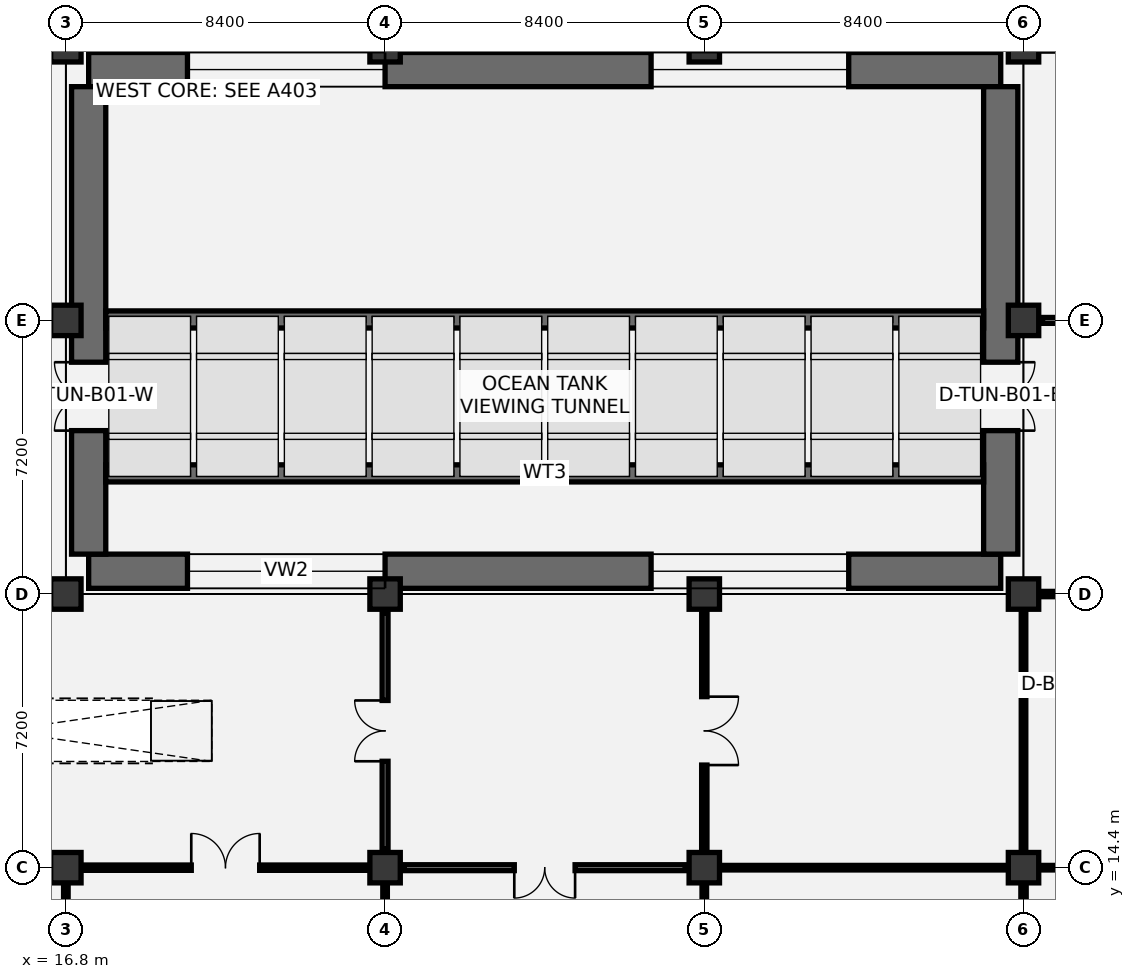
"""IFC4 building model, lengths in metres.
Left out: names, types, materials, properties, quantities, classifications, styles, units other than length and angle.
Written with IfcOpenShell. Run it as: python <this file> out.ifc"""

import sys

from ifc_helpers import new_model, si_unit, direction, frame, frame_2d, origin, origin_2d, place, context, subcontext, project, spatial, rectangle, extrude, element, fill, save


model = new_model("IFC4")
c1 = context("Model", 3, precision=1e-05, world=origin(), true_north=direction((0.0, 1.0)))
c2 = subcontext(c1, "Body", "Model", "MODEL_VIEW")
j1 = project(units=[si_unit("LENGTHUNIT", "METRE"), si_unit("PLANEANGLEUNIT", "RADIAN")], contexts=[c1])
p1 = place(None, origin())
s1 = spatial("IfcSite", under=j1, at=p1, CompositionType="ELEMENT")
p2 = place(p1, origin())
s2 = spatial("IfcBuilding", under=s1, at=p2, CompositionType="ELEMENT")
p3 = place(p2, frame((0.0, 0.0, -4.8)))
s3 = spatial("IfcBuildingStorey", under=s2, at=p3, CompositionType="ELEMENT", Elevation=-4.8)
for number, where, z_axis, x_axis in (
    (1, (16.8, 14.4, 0.0), (0.0, 0.0, 1.0), (1.0, 0.0, 0.0)),
    (2, (16.8, 21.6, 0.0), (0.0, 0.0, 1.0), (1.0, 0.0, 0.0)),
    (3, (16.8, 28.8, 0.0), (0.0, 0.0, 1.0), (1.0, 0.0, 0.0)),
    (4, (16.8, 36.0, 0.0), (0.0, 0.0, 1.0), (1.0, 0.0, 0.0)),
    (5, (25.2, 14.4, 0.0), (0.0, 0.0, 1.0), (1.0, 0.0, 0.0)),
    (6, (25.2, 21.6, 0.0), (0.0, 0.0, 1.0), (1.0, 0.0, 0.0)),
    (7, (25.2, 36.0, 0.0), (0.0, 0.0, 1.0), (1.0, 0.0, 0.0)),
    (8, (33.6, 14.4, 0.0), (0.0, 0.0, 1.0), (1.0, 0.0, 0.0)),
    (9, (33.6, 21.6, 0.0), (0.0, 0.0, 1.0), (1.0, 0.0, 0.0)),
    (10, (33.6, 36.0, 0.0), (0.0, 0.0, 1.0), (1.0, 0.0, 0.0)),
    (11, (42.0, 14.4, 0.0), (0.0, 0.0, 1.0), (1.0, 0.0, 0.0)),
    (12, (42.0, 21.6, 0.0), (0.0, 0.0, 1.0), (1.0, 0.0, 0.0)),
    (13, (42.0, 28.8, 0.0), (0.0, 0.0, 1.0), (1.0, 0.0, 0.0)),
    (14, (42.0, 36.0, 0.0), (0.0, 0.0, 1.0), (1.0, 0.0, 0.0)),
):
    element("IfcColumn", number, at=place(p3, frame(where, z_axis=z_axis, x_axis=x_axis)), inside=s3, PredefinedType="COLUMN", context=c2, shape_type="SweptSolid", body=[
        extrude(rectangle(XDim=0.8, YDim=0.8, at=origin_2d()), origin(), (0.0, 0.0, 1.0), 4.8),
    ])
p4 = place(p3, frame((17.4, 22.2, 0.0), z_axis=(0.0, 0.0, 1.0), x_axis=(1.0, 0.0, 0.0)))
e15 = element("IfcWall", 15, at=p4, inside=s3, PredefinedType="SOLIDWALL", context=c2, shape_type="SweptSolid", body=[
    extrude(rectangle(XDim=24.0, YDim=0.9, at=frame_2d((12.0, 0.0))), origin(), (0.0, 0.0, 1.0), 4.8),
])
p5 = place(p4, frame((2.6, 0.0, 0.85)))
e16 = element("IfcOpeningElement", 16, at=p5, cuts=e15, PredefinedType="OPENING", context=c2, shape_type="SweptSolid", body=[
    extrude(rectangle(XDim=5.2, YDim=2.9, at=frame_2d((2.6, 1.45))), frame((0.0, 0.46, 0.0), z_axis=(0.0, -1.0, 0.0), x_axis=(1.0, 0.0, 0.0)), (0.0, 0.0, 1.0), 0.92),
])
p6 = place(p4, frame((14.8, 0.0, 0.85)))
e17 = element("IfcOpeningElement", 17, at=p6, cuts=e15, PredefinedType="OPENING", context=c2, shape_type="SweptSolid", body=[
    extrude(rectangle(XDim=5.2, YDim=2.9, at=frame_2d((2.6, 1.45))), frame((0.0, 0.46, 0.0), z_axis=(0.0, -1.0, 0.0), x_axis=(1.0, 0.0, 0.0)), (0.0, 0.0, 1.0), 0.92),
])
p7 = place(p3, frame((17.4, 35.4, 0.0), z_axis=(0.0, 0.0, 1.0), x_axis=(1.0, 0.0, 0.0)))
e18 = element("IfcWall", 18, at=p7, inside=s3, PredefinedType="SOLIDWALL", context=c2, shape_type="SweptSolid", body=[
    extrude(rectangle(XDim=24.0, YDim=0.9, at=frame_2d((12.0, 0.0))), origin(), (0.0, 0.0, 1.0), 4.8),
])
p8 = place(p7, frame((2.6, 0.0, 0.85)))
e19 = element("IfcOpeningElement", 19, at=p8, cuts=e18, PredefinedType="OPENING", context=c2, shape_type="SweptSolid", body=[
    extrude(rectangle(XDim=5.2, YDim=2.9, at=frame_2d((2.6, 1.45))), frame((0.0, 0.46, 0.0), z_axis=(0.0, -1.0, 0.0), x_axis=(1.0, 0.0, 0.0)), (0.0, 0.0, 1.0), 0.92),
])
p9 = place(p7, frame((14.8, 0.0, 0.85)))
e20 = element("IfcOpeningElement", 20, at=p9, cuts=e18, PredefinedType="OPENING", context=c2, shape_type="SweptSolid", body=[
    extrude(rectangle(XDim=5.2, YDim=2.9, at=frame_2d((2.6, 1.45))), frame((0.0, 0.46, 0.0), z_axis=(0.0, -1.0, 0.0), x_axis=(1.0, 0.0, 0.0)), (0.0, 0.0, 1.0), 0.92),
])
p10 = place(p3, frame((17.4, 22.65, 0.0), z_axis=(0.0, 0.0, 1.0), x_axis=(0.0, 1.0, 0.0)))
e21 = element("IfcWall", 21, at=p10, inside=s3, PredefinedType="SOLIDWALL", context=c2, shape_type="SweptSolid", body=[
    extrude(rectangle(XDim=12.3, YDim=0.9, at=frame_2d((6.15, 0.0))), origin(), (0.0, 0.0, 1.0), 4.8),
])
p11 = place(p10, frame((3.25, 0.0, 0.0)))
e22 = element("IfcOpeningElement", 22, at=p11, cuts=e21, PredefinedType="OPENING", context=c2, shape_type="SweptSolid", body=[
    extrude(rectangle(XDim=1.8, YDim=2.2, at=frame_2d((0.9, 1.1))), frame((0.0, 0.46, 0.0), z_axis=(0.0, -1.0, 0.0), x_axis=(1.0, 0.0, 0.0)), (0.0, 0.0, 1.0), 0.92),
])
p12 = place(p3, frame((41.4, 22.65, 0.0), z_axis=(0.0, 0.0, 1.0), x_axis=(0.0, 1.0, 0.0)))
e23 = element("IfcWall", 23, at=p12, inside=s3, PredefinedType="SOLIDWALL", context=c2, shape_type="SweptSolid", body=[
    extrude(rectangle(XDim=12.3, YDim=0.9, at=frame_2d((6.15, 0.0))), origin(), (0.0, 0.0, 1.0), 4.8),
])
p13 = place(p12, frame((3.25, 0.0, 0.0)))
e24 = element("IfcOpeningElement", 24, at=p13, cuts=e23, PredefinedType="OPENING", context=c2, shape_type="SweptSolid", body=[
    extrude(rectangle(XDim=1.8, YDim=2.2, at=frame_2d((0.9, 1.1))), frame((0.0, 0.46, 0.0), z_axis=(0.0, -1.0, 0.0), x_axis=(1.0, 0.0, 0.0)), (0.0, 0.0, 1.0), 0.92),
])
for number, where, z_axis, x_axis in (
    (25, (17.85, 24.775, 0.0), (0.0, 0.0, 1.0), (1.0, 0.0, 0.0)),
    (26, (17.85, 28.825, 0.0), (0.0, 0.0, 1.0), (1.0, 0.0, 0.0)),
):
    element("IfcWall", number, at=place(p3, frame(where, z_axis=z_axis, x_axis=x_axis)), inside=s3, PredefinedType="SOLIDWALL", context=c2, shape_type="SweptSolid", body=[
        extrude(rectangle(XDim=23.1, YDim=0.45, at=frame_2d((11.55, 0.0))), origin(), (0.0, 0.0, 1.0), 0.9),
    ])
p14 = place(p3, frame((42.15, 19.2, 0.0), z_axis=(0.0, 0.0, 1.0), x_axis=(1.0, 0.0, 0.0)))
e27 = element("IfcWall", 27, at=p14, inside=s3, PredefinedType="PARTITIONING", context=c2, shape_type="SweptSolid", body=[
    extrude(rectangle(XDim=8.1, YDim=0.12, at=frame_2d((4.05, 0.0))), origin(), (0.0, 0.0, 1.0), 4.45),
])
p15 = place(p14, frame((1.08, 0.0, 0.0)))
e28 = element("IfcOpeningElement", 28, at=p15, cuts=e27, PredefinedType="OPENING", context=c2, shape_type="SweptSolid", body=[
    extrude(rectangle(XDim=0.95, YDim=2.1, at=frame_2d((0.475, 1.05))), frame((0.0, 0.07, 0.0), z_axis=(0.0, -1.0, 0.0), x_axis=(1.0, 0.0, 0.0)), (0.0, 0.0, 1.0), 0.14),
])
p16 = place(p14, frame((3.63, 0.0, 0.0)))
e29 = element("IfcOpeningElement", 29, at=p16, cuts=e27, PredefinedType="OPENING", context=c2, shape_type="SweptSolid", body=[
    extrude(rectangle(XDim=0.9, YDim=2.1, at=frame_2d((0.45, 1.05))), frame((0.0, 0.07, 0.0), z_axis=(0.0, -1.0, 0.0), x_axis=(1.0, 0.0, 0.0)), (0.0, 0.0, 1.0), 0.14),
])
p17 = place(p14, frame((6.13, 0.0, 0.0)))
e30 = element("IfcOpeningElement", 30, at=p17, cuts=e27, PredefinedType="OPENING", context=c2, shape_type="SweptSolid", body=[
    extrude(rectangle(XDim=1.0, YDim=2.1, at=frame_2d((0.5, 1.05))), frame((0.0, 0.07, 0.0), z_axis=(0.0, -1.0, 0.0), x_axis=(1.0, 0.0, 0.0)), (0.0, 0.0, 1.0), 0.14),
])
for number, where, z_axis, x_axis in (
    (31, (16.8, 7.7, 0.0), (0.0, 0.0, 1.0), (0.0, 1.0, 0.0)),
    (32, (25.2, 7.7, 0.0), (0.0, 0.0, 1.0), (0.0, 1.0, 0.0)),
):
    element("IfcWall", number, at=place(p3, frame(where, z_axis=z_axis, x_axis=x_axis)), inside=s3, PredefinedType="PARTITIONING", context=c2, shape_type="SweptSolid", body=[
        extrude(rectangle(XDim=6.2, YDim=0.12, at=frame_2d((3.1, 0.0))), origin(), (0.0, 0.0, 1.0), 3.645),
    ])
p18 = place(p3, frame((17.3, 14.4, 0.0), z_axis=(0.0, 0.0, 1.0), x_axis=(1.0, 0.0, 0.0)))
e33 = element("IfcWall", 33, at=p18, inside=s3, PredefinedType="PARTITIONING", context=c2, shape_type="SweptSolid", body=[
    extrude(rectangle(XDim=7.4, YDim=0.14, at=frame_2d((3.7, 0.0))), origin(), (0.0, 0.0, 1.0), 3.545),
])
p19 = place(p18, frame((2.8, 0.0, 0.0)))
e34 = element("IfcOpeningElement", 34, at=p19, cuts=e33, PredefinedType="OPENING", context=c2, shape_type="SweptSolid", body=[
    extrude(rectangle(XDim=1.8, YDim=2.25, at=frame_2d((0.9, 1.125))), frame((0.0, 0.08, 0.0), z_axis=(0.0, -1.0, 0.0), x_axis=(1.0, 0.0, 0.0)), (0.0, 0.0, 1.0), 0.16),
])
p20 = place(p3, frame((25.2, 14.9, 0.0), z_axis=(0.0, 0.0, 1.0), x_axis=(0.0, 1.0, 0.0)))
e35 = element("IfcWall", 35, at=p20, inside=s3, PredefinedType="PARTITIONING", context=c2, shape_type="SweptSolid", body=[
    extrude(rectangle(XDim=6.2, YDim=0.155, at=frame_2d((3.1, 0.0))), origin(), (0.0, 0.0, 1.0), 3.645),
])
p21 = place(p20, frame((2.3, 0.0, 0.0)))
e36 = element("IfcOpeningElement", 36, at=p21, cuts=e35, PredefinedType="OPENING", context=c2, shape_type="SweptSolid", body=[
    extrude(rectangle(XDim=1.6, YDim=2.2, at=frame_2d((0.8, 1.1))), frame((0.0, 0.087, 0.0), z_axis=(0.0, -1.0, 0.0), x_axis=(1.0, 0.0, 0.0)), (0.0, 0.0, 1.0), 0.175),
])
p22 = place(p3, frame((33.6, 7.7, 0.0), z_axis=(0.0, 0.0, 1.0), x_axis=(0.0, 1.0, 0.0)))
e37 = element("IfcWall", 37, at=p22, inside=s3, PredefinedType="PARTITIONING", context=c2, shape_type="SweptSolid", body=[
    extrude(rectangle(XDim=6.2, YDim=0.12, at=frame_2d((3.1, 0.0))), origin(), (0.0, 0.0, 1.0), 3.645),
])
p23 = place(p3, frame((25.7, 14.4, 0.0), z_axis=(0.0, 0.0, 1.0), x_axis=(1.0, 0.0, 0.0)))
e38 = element("IfcWall", 38, at=p23, inside=s3, PredefinedType="PARTITIONING", context=c2, shape_type="SweptSolid", body=[
    extrude(rectangle(XDim=7.4, YDim=0.155, at=frame_2d((3.7, 0.0))), origin(), (0.0, 0.0, 1.0), 3.545),
])
p24 = place(p23, frame((2.9, 0.0, 0.0)))
e39 = element("IfcOpeningElement", 39, at=p24, cuts=e38, PredefinedType="OPENING", context=c2, shape_type="SweptSolid", body=[
    extrude(rectangle(XDim=1.6, YDim=2.2, at=frame_2d((0.8, 1.1))), frame((0.0, 0.087, 0.0), z_axis=(0.0, -1.0, 0.0), x_axis=(1.0, 0.0, 0.0)), (0.0, 0.0, 1.0), 0.175),
])
p25 = place(p3, frame((33.6, 14.9, 0.0), z_axis=(0.0, 0.0, 1.0), x_axis=(0.0, 1.0, 0.0)))
e40 = element("IfcWall", 40, at=p25, inside=s3, PredefinedType="PARTITIONING", context=c2, shape_type="SweptSolid", body=[
    extrude(rectangle(XDim=6.2, YDim=0.14, at=frame_2d((3.1, 0.0))), origin(), (0.0, 0.0, 1.0), 3.645),
])
p26 = place(p25, frame((2.2, 0.0, 0.0)))
e41 = element("IfcOpeningElement", 41, at=p26, cuts=e40, PredefinedType="OPENING", context=c2, shape_type="SweptSolid", body=[
    extrude(rectangle(XDim=1.8, YDim=2.25, at=frame_2d((0.9, 1.125))), frame((0.0, 0.08, 0.0), z_axis=(0.0, -1.0, 0.0), x_axis=(1.0, 0.0, 0.0)), (0.0, 0.0, 1.0), 0.16),
])
p27 = place(p3, frame((42.0, 7.7, 0.0), z_axis=(0.0, 0.0, 1.0), x_axis=(0.0, 1.0, 0.0)))
e42 = element("IfcWall", 42, at=p27, inside=s3, PredefinedType="PARTITIONING", context=c2, shape_type="SweptSolid", body=[
    extrude(rectangle(XDim=6.2, YDim=0.14, at=frame_2d((3.1, 0.0))), origin(), (0.0, 0.0, 1.0), 3.645),
])
p28 = place(p27, frame((2.3, 0.0, 0.0)))
e43 = element("IfcOpeningElement", 43, at=p28, cuts=e42, PredefinedType="OPENING", context=c2, shape_type="SweptSolid", body=[
    extrude(rectangle(XDim=1.6, YDim=2.2, at=frame_2d((0.8, 1.1))), frame((0.0, 0.08, 0.0), z_axis=(0.0, -1.0, 0.0), x_axis=(1.0, 0.0, 0.0)), (0.0, 0.0, 1.0), 0.16),
])
p29 = place(p3, frame((34.1, 14.4, 0.0), z_axis=(0.0, 0.0, 1.0), x_axis=(1.0, 0.0, 0.0)))
e44 = element("IfcWall", 44, at=p29, inside=s3, PredefinedType="PARTITIONING", context=c2, shape_type="SweptSolid", body=[
    extrude(rectangle(XDim=7.4, YDim=0.12, at=frame_2d((3.7, 0.0))), origin(), (0.0, 0.0, 1.0), 3.545),
])
p30 = place(p3, frame((42.0, 14.9, 0.0), z_axis=(0.0, 0.0, 1.0), x_axis=(0.0, 1.0, 0.0)))
e45 = element("IfcWall", 45, at=p30, inside=s3, PredefinedType="PARTITIONING", context=c2, shape_type="SweptSolid", body=[
    extrude(rectangle(XDim=6.2, YDim=0.12, at=frame_2d((3.1, 0.0))), origin(), (0.0, 0.0, 1.0), 3.645),
])
p31 = place(p3, frame((42.5, 14.4, 0.0), z_axis=(0.0, 0.0, 1.0), x_axis=(1.0, 0.0, 0.0)))
e46 = element("IfcWall", 46, at=p31, inside=s3, PredefinedType="PARTITIONING", context=c2, shape_type="SweptSolid", body=[
    extrude(rectangle(XDim=7.4, YDim=0.12, at=frame_2d((3.7, 0.0))), origin(), (0.0, 0.0, 1.0), 3.545),
])
p32 = place(p3, frame((42.5, 21.6, 0.0), z_axis=(0.0, 0.0, 1.0), x_axis=(1.0, 0.0, 0.0)))
e47 = element("IfcWall", 47, at=p32, inside=s3, PredefinedType="PARTITIONING", context=c2, shape_type="SweptSolid", body=[
    extrude(rectangle(XDim=7.4, YDim=0.14, at=frame_2d((3.7, 0.0))), origin(), (0.0, 0.0, 1.0), 3.545),
])
p33 = place(p32, frame((2.8, 0.0, 0.0)))
e48 = element("IfcOpeningElement", 48, at=p33, cuts=e47, PredefinedType="OPENING", context=c2, shape_type="SweptSolid", body=[
    extrude(rectangle(XDim=1.8, YDim=2.25, at=frame_2d((0.9, 1.125))), frame((0.0, 0.08, 0.0), z_axis=(0.0, -1.0, 0.0), x_axis=(1.0, 0.0, 0.0)), (0.0, 0.0, 1.0), 0.16),
])
p34 = place(p3, frame((42.5, 28.8, 0.0), z_axis=(0.0, 0.0, 1.0), x_axis=(1.0, 0.0, 0.0)))
e49 = element("IfcWall", 49, at=p34, inside=s3, PredefinedType="PARTITIONING", context=c2, shape_type="SweptSolid", body=[
    extrude(rectangle(XDim=7.4, YDim=0.155, at=frame_2d((3.7, 0.0))), origin(), (0.0, 0.0, 1.0), 3.545),
])
p35 = place(p34, frame((2.9, 0.0, 0.0)))
e50 = element("IfcOpeningElement", 50, at=p35, cuts=e49, PredefinedType="OPENING", context=c2, shape_type="SweptSolid", body=[
    extrude(rectangle(XDim=1.6, YDim=2.2, at=frame_2d((0.8, 1.1))), frame((0.0, 0.087, 0.0), z_axis=(0.0, -1.0, 0.0), x_axis=(1.0, 0.0, 0.0)), (0.0, 0.0, 1.0), 0.175),
])
p36 = place(p5, origin())
e51 = element("IfcWindow", 51, at=p36, inside=s3, PartitioningType="SINGLE_PANEL", PredefinedType="WINDOW", context=c2, shape_type="SweptSolid", body=[
    extrude(rectangle(XDim=5.2, YDim=2.9, at=frame_2d((2.6, 1.45))), frame((0.0, 0.175, 0.0), z_axis=(0.0, -1.0, 0.0), x_axis=(1.0, 0.0, 0.0)), (0.0, 0.0, 1.0), 0.35),
])
fill(e16, e51)
p37 = place(p6, origin())
e52 = element("IfcWindow", 52, at=p37, inside=s3, PartitioningType="SINGLE_PANEL", PredefinedType="WINDOW", context=c2, shape_type="SweptSolid", body=[
    extrude(rectangle(XDim=5.2, YDim=2.9, at=frame_2d((2.6, 1.45))), frame((0.0, 0.175, 0.0), z_axis=(0.0, -1.0, 0.0), x_axis=(1.0, 0.0, 0.0)), (0.0, 0.0, 1.0), 0.35),
])
fill(e17, e52)
p38 = place(p8, origin())
e53 = element("IfcWindow", 53, at=p38, inside=s3, PartitioningType="SINGLE_PANEL", PredefinedType="WINDOW", context=c2, shape_type="SweptSolid", body=[
    extrude(rectangle(XDim=5.2, YDim=2.9, at=frame_2d((2.6, 1.45))), frame((0.0, 0.175, 0.0), z_axis=(0.0, -1.0, 0.0), x_axis=(1.0, 0.0, 0.0)), (0.0, 0.0, 1.0), 0.35),
])
fill(e19, e53)
p39 = place(p9, origin())
e54 = element("IfcWindow", 54, at=p39, inside=s3, PartitioningType="SINGLE_PANEL", PredefinedType="WINDOW", context=c2, shape_type="SweptSolid", body=[
    extrude(rectangle(XDim=5.2, YDim=2.9, at=frame_2d((2.6, 1.45))), frame((0.0, 0.175, 0.0), z_axis=(0.0, -1.0, 0.0), x_axis=(1.0, 0.0, 0.0)), (0.0, 0.0, 1.0), 0.35),
])
fill(e20, e54)
p40 = place(p11, origin())
e55 = element("IfcDoor", 55, at=p40, inside=s3, OperationType="DOUBLE_DOOR_SINGLE_SWING", PredefinedType="DOOR", context=c2, shape_type="SweptSolid", body=[
    extrude(rectangle(XDim=1.8, YDim=2.2, at=frame_2d((0.9, 1.1))), frame((0.0, 0.025, 0.0), z_axis=(0.0, -1.0, 0.0), x_axis=(1.0, 0.0, 0.0)), (0.0, 0.0, 1.0), 0.05),
])
fill(e22, e55)
p41 = place(p13, frame((1.8, 0.0, 0.0), z_axis=(0.0, 0.0, 1.0), x_axis=(-1.0, 0.0, 0.0)))
e56 = element("IfcDoor", 56, at=p41, inside=s3, OperationType="DOUBLE_DOOR_SINGLE_SWING", PredefinedType="DOOR", context=c2, shape_type="SweptSolid", body=[
    extrude(rectangle(XDim=1.8, YDim=2.2, at=frame_2d((0.9, 1.1))), frame((0.0, 0.025, 0.0), z_axis=(0.0, -1.0, 0.0), x_axis=(1.0, 0.0, 0.0)), (0.0, 0.0, 1.0), 0.05),
])
fill(e24, e56)
p42 = place(p19, origin())
e57 = element("IfcDoor", 57, at=p42, inside=s3, OperationType="DOUBLE_DOOR_SINGLE_SWING", PredefinedType="DOOR", context=c2, shape_type="SweptSolid", body=[
    extrude(rectangle(XDim=1.8, YDim=2.25, at=frame_2d((0.9, 1.125))), frame((0.0, 0.025, 0.0), z_axis=(0.0, -1.0, 0.0), x_axis=(1.0, 0.0, 0.0)), (0.0, 0.0, 1.0), 0.05),
])
fill(e34, e57)
p43 = place(p21, origin())
e58 = element("IfcDoor", 58, at=p43, inside=s3, OperationType="DOUBLE_DOOR_SINGLE_SWING", PredefinedType="DOOR", context=c2, shape_type="SweptSolid", body=[
    extrude(rectangle(XDim=1.6, YDim=2.2, at=frame_2d((0.8, 1.1))), frame((0.0, 0.025, 0.0), z_axis=(0.0, -1.0, 0.0), x_axis=(1.0, 0.0, 0.0)), (0.0, 0.0, 1.0), 0.05),
])
fill(e36, e58)
p44 = place(p24, frame((1.6, 0.0, 0.0), z_axis=(0.0, 0.0, 1.0), x_axis=(-1.0, 0.0, 0.0)))
e59 = element("IfcDoor", 59, at=p44, inside=s3, OperationType="DOUBLE_DOOR_SINGLE_SWING", PredefinedType="DOOR", context=c2, shape_type="SweptSolid", body=[
    extrude(rectangle(XDim=1.6, YDim=2.2, at=frame_2d((0.8, 1.1))), frame((0.0, 0.025, 0.0), z_axis=(0.0, -1.0, 0.0), x_axis=(1.0, 0.0, 0.0)), (0.0, 0.0, 1.0), 0.05),
])
fill(e39, e59)
p45 = place(p26, frame((1.8, 0.0, 0.0), z_axis=(0.0, 0.0, 1.0), x_axis=(-1.0, 0.0, 0.0)))
e60 = element("IfcDoor", 60, at=p45, inside=s3, OperationType="DOUBLE_DOOR_SINGLE_SWING", PredefinedType="DOOR", context=c2, shape_type="SweptSolid", body=[
    extrude(rectangle(XDim=1.8, YDim=2.25, at=frame_2d((0.9, 1.125))), frame((0.0, 0.025, 0.0), z_axis=(0.0, -1.0, 0.0), x_axis=(1.0, 0.0, 0.0)), (0.0, 0.0, 1.0), 0.05),
])
fill(e41, e60)
save(model, sys.argv[1])
